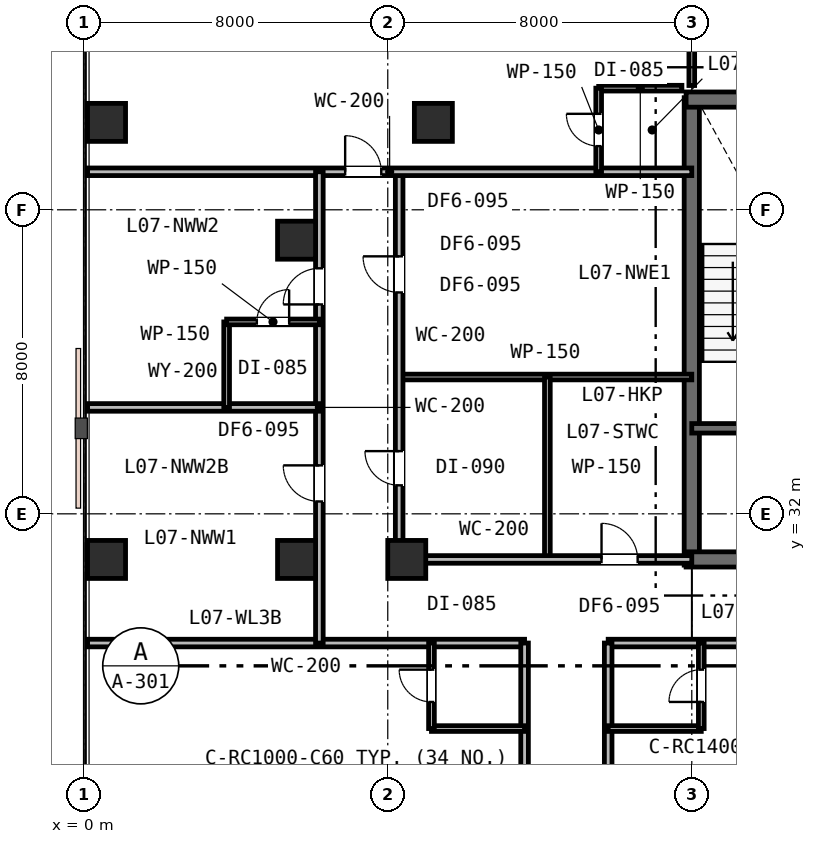
"""IFC4 building model, lengths in metres.
Left out: names, types, materials, properties, quantities, classifications, styles, units other than length and angle.
Written with IfcOpenShell. Run it as: python <this file> out.ifc"""

import sys

from ifc_helpers import new_model, si_unit, direction, frame, frame_2d, origin, origin_2d, place, context, subcontext, project, spatial, rectangle, extrude, element, fill, save


model = new_model("IFC4")
c1 = context("Model", 3, precision=1e-05, world=origin(), true_north=direction((0.0, 1.0)))
c2 = subcontext(c1, "Body", "Model", "MODEL_VIEW")
j1 = project(units=[si_unit("LENGTHUNIT", "METRE"), si_unit("PLANEANGLEUNIT", "RADIAN")], contexts=[c1])
p1 = place(None, origin())
s1 = spatial("IfcSite", under=j1, at=p1, CompositionType="ELEMENT")
p2 = place(p1, origin())
s2 = spatial("IfcBuilding", under=s1, at=p2, CompositionType="ELEMENT")
p3 = place(p2, frame((0.0, 0.0, 33.0)))
s3 = spatial("IfcBuildingStorey", under=s2, at=p3, CompositionType="ELEMENT", Elevation=33.0)
p4 = place(p3, frame((16.0, 30.65, 0.0), z_axis=(0.0, 0.0, 1.0), x_axis=(0.0, 1.0, 0.0)))
e1 = element("IfcWall", 1, at=p4, inside=s3, PredefinedType="SHEAR", context=c2, shape_type="SweptSolid", body=[
    extrude(rectangle(XDim=12.3, YDim=0.4, at=frame_2d((6.15, 0.0))), origin(), (0.0, 0.0, 1.0), 3.6),
])
p5 = place(p3, frame((15.85, 42.9, 0.0), z_axis=(0.0, 0.0, 1.0), x_axis=(1.0, 0.0, 0.0)))
e2 = element("IfcWall", 2, at=p5, inside=s3, PredefinedType="SHEAR", context=c2, shape_type="SweptSolid", body=[
    extrude(rectangle(XDim=24.3, YDim=0.4, at=frame_2d((12.15, 0.0))), origin(), (0.0, 0.0, 1.0), 3.6),
])
p6 = place(p3, frame((15.85, 30.8, 0.0), z_axis=(0.0, 0.0, 1.0), x_axis=(1.0, 0.0, 0.0)))
e3 = element("IfcWall", 3, at=p6, inside=s3, PredefinedType="SHEAR", context=c2, shape_type="SweptSolid", body=[
    extrude(rectangle(XDim=11.2, YDim=0.4, at=frame_2d((5.6, 0.0))), origin(), (0.0, 0.0, 1.0), 3.6),
])
p7 = place(p6, frame((2.45, 0.0, 0.0)))
e4 = element("IfcOpeningElement", 4, at=p7, cuts=e3, PredefinedType="OPENING", context=c2, shape_type="SweptSolid", body=[
    extrude(rectangle(XDim=1.1, YDim=2.15, at=frame_2d((0.55, 1.075))), frame((0.0, 0.21, 0.0), z_axis=(0.0, -1.0, 0.0), x_axis=(1.0, 0.0, 0.0)), (0.0, 0.0, 1.0), 0.42),
])
p8 = place(p3, frame((16.0, 34.25, 0.0), z_axis=(0.0, 0.0, 1.0), x_axis=(1.0, 0.0, 0.0)))
e5 = element("IfcWall", 5, at=p8, inside=s3, PredefinedType="SHEAR", context=c2, shape_type="SweptSolid", body=[
    extrude(rectangle(XDim=6.05, YDim=0.25, at=frame_2d((3.025, 0.0))), origin(), (0.0, 0.0, 1.0), 3.6),
])
p9 = place(p8, frame((1.25, 0.0, 0.0)))
e6 = element("IfcOpeningElement", 6, at=p9, cuts=e5, PredefinedType="OPENING", context=c2, shape_type="SweptSolid", body=[
    extrude(rectangle(XDim=1.0, YDim=2.15, at=frame_2d((0.5, 1.075))), frame((0.0, 0.135, 0.0), z_axis=(0.0, -1.0, 0.0), x_axis=(1.0, 0.0, 0.0)), (0.0, 0.0, 1.0), 0.27),
])
p10 = place(p8, frame((4.2, 0.0, 0.0)))
e7 = element("IfcOpeningElement", 7, at=p10, cuts=e5, PredefinedType="OPENING", context=c2, shape_type="SweptSolid", body=[
    extrude(rectangle(XDim=1.1, YDim=2.15, at=frame_2d((0.55, 1.075))), frame((0.0, 0.135, 0.0), z_axis=(0.0, -1.0, 0.0), x_axis=(1.0, 0.0, 0.0)), (0.0, 0.0, 1.0), 0.27),
])
for number, where, z_axis, x_axis in (
    (8, (5.6, 30.8, 0.0), (0.0, 0.0, 1.0), (1.0, 0.0, 0.0)),
    (9, (5.6, 39.2, 0.0), (0.0, 0.0, 1.0), (1.0, 0.0, 0.0)),
    (10, (8.5, 30.8, 0.0), (0.0, 0.0, 1.0), (1.0, 0.0, 0.0)),
    (11, (9.2, 42.3, 0.0), (0.0, 0.0, 1.0), (1.0, 0.0, 0.0)),
    (12, (0.6, 30.8, 0.0), (0.0, 0.0, 1.0), (1.0, 0.0, 0.0)),
    (13, (0.6, 42.3, 0.0), (0.0, 0.0, 1.0), (1.0, 0.0, 0.0)),
):
    element("IfcColumn", number, at=place(p3, frame(where, z_axis=z_axis, x_axis=x_axis)), inside=s3, PredefinedType="COLUMN", context=c2, shape_type="SweptSolid", body=[
        extrude(rectangle(XDim=1.0, YDim=1.0, at=origin_2d()), origin(), (0.0, 0.0, 1.0), 3.6),
    ])
p11 = place(p3, frame((0.1, 28.6, 0.0), z_axis=(0.0, 0.0, 1.0), x_axis=(1.0, 0.0, 0.0)))
e14 = element("IfcWall", 14, at=p11, inside=s3, PredefinedType="PARTITIONING", context=c2, shape_type="SweptSolid", body=[
    extrude(rectangle(XDim=11.5, YDim=0.2, at=frame_2d((5.75, 0.0))), origin(), (0.0, 0.0, 1.0), 2.68),
])
p12 = place(p3, frame((13.8, 28.6, 0.0), z_axis=(0.0, 0.0, 1.0), x_axis=(1.0, 0.0, 0.0)))
e15 = element("IfcWall", 15, at=p12, inside=s3, PredefinedType="PARTITIONING", context=c2, shape_type="SweptSolid", body=[
    extrude(rectangle(XDim=36.6, YDim=0.2, at=frame_2d((18.3, 0.0))), origin(), (0.0, 0.0, 1.0), 2.68),
])
p13 = place(p12, frame((12.3, 0.0, 0.0)))
e16 = element("IfcOpeningElement", 16, at=p13, cuts=e15, PredefinedType="OPENING", context=c2, shape_type="SweptSolid", body=[
    extrude(rectangle(XDim=0.95, YDim=2.15, at=frame_2d((0.475, 1.075))), frame((0.0, 0.11, 0.0), z_axis=(0.0, -1.0, 0.0), x_axis=(1.0, 0.0, 0.0)), (0.0, 0.0, 1.0), 0.22),
])
p14 = place(p12, frame((20.075, 0.0, 0.0)))
e17 = element("IfcOpeningElement", 17, at=p14, cuts=e15, PredefinedType="OPENING", context=c2, shape_type="SweptSolid", body=[
    extrude(rectangle(XDim=0.95, YDim=2.15, at=frame_2d((0.475, 1.075))), frame((0.0, 0.11, 0.0), z_axis=(0.0, -1.0, 0.0), x_axis=(1.0, 0.0, 0.0)), (0.0, 0.0, 1.0), 0.22),
])
p15 = place(p12, frame((26.829, 0.0, 0.0)))
e18 = element("IfcOpeningElement", 18, at=p15, cuts=e15, PredefinedType="OPENING", context=c2, shape_type="SweptSolid", body=[
    extrude(rectangle(XDim=0.95, YDim=2.15, at=frame_2d((0.475, 1.075))), frame((0.0, 0.11, 0.0), z_axis=(0.0, -1.0, 0.0), x_axis=(1.0, 0.0, 0.0)), (0.0, 0.0, 1.0), 0.22),
])
p16 = place(p12, frame((32.669, 0.0, 0.0)))
e19 = element("IfcOpeningElement", 19, at=p16, cuts=e15, PredefinedType="OPENING", context=c2, shape_type="SweptSolid", body=[
    extrude(rectangle(XDim=0.95, YDim=2.15, at=frame_2d((0.475, 1.075))), frame((0.0, 0.11, 0.0), z_axis=(0.0, -1.0, 0.0), x_axis=(1.0, 0.0, 0.0)), (0.0, 0.0, 1.0), 0.22),
])
p17 = place(p3, frame((8.3, 35.6, 0.0), z_axis=(0.0, 0.0, 1.0), x_axis=(1.0, 0.0, 0.0)))
e20 = element("IfcWall", 20, at=p17, inside=s3, PredefinedType="PARTITIONING", context=c2, shape_type="SweptSolid", body=[
    extrude(rectangle(XDim=7.7, YDim=0.15, at=frame_2d((3.85, 0.0))), origin(), (0.0, 0.0, 1.0), 2.68),
])
p18 = place(p3, frame((12.2, 30.8, 0.0), z_axis=(0.0, 0.0, 1.0), x_axis=(0.0, 1.0, 0.0)))
e21 = element("IfcWall", 21, at=p18, inside=s3, PredefinedType="PARTITIONING", context=c2, shape_type="SweptSolid", body=[
    extrude(rectangle(XDim=4.8, YDim=0.15, at=frame_2d((2.4, 0.0))), origin(), (0.0, 0.0, 1.0), 2.68),
])
p19 = place(p3, frame((8.3, 30.8, 0.0), z_axis=(0.0, 0.0, 1.0), x_axis=(1.0, 0.0, 0.0)))
e22 = element("IfcWall", 22, at=p19, inside=s3, PredefinedType="PARTITIONING", context=c2, shape_type="SweptSolid", body=[
    extrude(rectangle(XDim=7.7, YDim=0.2, at=frame_2d((3.85, 0.0))), origin(), (0.0, 0.0, 1.0), 2.68),
])
p20 = place(p19, frame((5.325, 0.0, 0.0)))
e23 = element("IfcOpeningElement", 23, at=p20, cuts=e22, PredefinedType="OPENING", context=c2, shape_type="SweptSolid", body=[
    extrude(rectangle(XDim=0.95, YDim=2.15, at=frame_2d((0.475, 1.075))), frame((0.0, 0.11, 0.0), z_axis=(0.0, -1.0, 0.0), x_axis=(1.0, 0.0, 0.0)), (0.0, 0.0, 1.0), 0.22),
])
p21 = place(p3, frame((8.3, 30.8, 0.0), z_axis=(0.0, 0.0, 1.0), x_axis=(0.0, 1.0, 0.0)))
e24 = element("IfcWall", 24, at=p21, inside=s3, PredefinedType="PARTITIONING", context=c2, shape_type="SweptSolid", body=[
    extrude(rectangle(XDim=10.2, YDim=0.2, at=frame_2d((5.1, 0.0))), origin(), (0.0, 0.0, 1.0), 2.68),
])
p22 = place(p21, frame((1.95, 0.0, 0.0)))
e25 = element("IfcOpeningElement", 25, at=p22, cuts=e24, PredefinedType="OPENING", context=c2, shape_type="SweptSolid", body=[
    extrude(rectangle(XDim=0.9, YDim=2.15, at=frame_2d((0.45, 1.075))), frame((0.0, 0.11, 0.0), z_axis=(0.0, -1.0, 0.0), x_axis=(1.0, 0.0, 0.0)), (0.0, 0.0, 1.0), 0.22),
])
p23 = place(p21, frame((7.025, 0.0, 0.0)))
e26 = element("IfcOpeningElement", 26, at=p23, cuts=e24, PredefinedType="OPENING", context=c2, shape_type="SweptSolid", body=[
    extrude(rectangle(XDim=0.95, YDim=2.15, at=frame_2d((0.475, 1.075))), frame((0.0, 0.11, 0.0), z_axis=(0.0, -1.0, 0.0), x_axis=(1.0, 0.0, 0.0)), (0.0, 0.0, 1.0), 0.22),
])
p24 = place(p3, frame((0.1, 41.0, 0.0), z_axis=(0.0, 0.0, 1.0), x_axis=(1.0, 0.0, 0.0)))
e27 = element("IfcWall", 27, at=p24, inside=s3, PredefinedType="PARTITIONING", context=c2, shape_type="SweptSolid", body=[
    extrude(rectangle(XDim=15.9, YDim=0.2, at=frame_2d((7.95, 0.0))), origin(), (0.0, 0.0, 1.0), 2.68),
])
p25 = place(p24, frame((6.779, 0.0, 0.0)))
e28 = element("IfcOpeningElement", 28, at=p25, cuts=e27, PredefinedType="OPENING", context=c2, shape_type="SweptSolid", body=[
    extrude(rectangle(XDim=0.95, YDim=2.15, at=frame_2d((0.475, 1.075))), frame((0.0, 0.11, 0.0), z_axis=(0.0, -1.0, 0.0), x_axis=(1.0, 0.0, 0.0)), (0.0, 0.0, 1.0), 0.22),
])
p26 = place(p3, frame((13.55, 43.2, 0.0), z_axis=(0.0, 0.0, 1.0), x_axis=(1.0, 0.0, 0.0)))
e29 = element("IfcWall", 29, at=p26, inside=s3, PredefinedType="PARTITIONING", context=c2, shape_type="SweptSolid", body=[
    extrude(rectangle(XDim=2.19, YDim=0.15, at=frame_2d((1.095, 0.0))), origin(), (0.0, 0.0, 1.0), 3.33),
])
p27 = place(p3, frame((13.55, 41.0, 0.0), z_axis=(0.0, 0.0, 1.0), x_axis=(0.0, 1.0, 0.0)))
e30 = element("IfcWall", 30, at=p27, inside=s3, PredefinedType="PARTITIONING", context=c2, shape_type="SweptSolid", body=[
    extrude(rectangle(XDim=2.2, YDim=0.15, at=frame_2d((1.1, 0.0))), origin(), (0.0, 0.0, 1.0), 3.33),
])
p28 = place(p27, frame((0.675, 0.0, 0.0)))
e31 = element("IfcOpeningElement", 31, at=p28, cuts=e30, PredefinedType="OPENING", context=c2, shape_type="SweptSolid", body=[
    extrude(rectangle(XDim=0.85, YDim=2.15, at=frame_2d((0.425, 1.075))), frame((0.0, 0.085, 0.0), z_axis=(0.0, -1.0, 0.0), x_axis=(1.0, 0.0, 0.0)), (0.0, 0.0, 1.0), 0.17),
])
p29 = place(p3, frame((6.2, 28.6, 0.0), z_axis=(0.0, 0.0, 1.0), x_axis=(0.0, 1.0, 0.0)))
e32 = element("IfcWall", 32, at=p29, inside=s3, PredefinedType="PARTITIONING", context=c2, shape_type="SweptSolid", body=[
    extrude(rectangle(XDim=12.4, YDim=0.2, at=frame_2d((6.2, 0.0))), origin(), (0.0, 0.0, 1.0), 2.68),
])
p30 = place(p29, frame((3.725, 0.0, 0.0)))
e33 = element("IfcOpeningElement", 33, at=p30, cuts=e32, PredefinedType="OPENING", context=c2, shape_type="SweptSolid", body=[
    extrude(rectangle(XDim=0.95, YDim=2.15, at=frame_2d((0.475, 1.075))), frame((0.0, 0.11, 0.0), z_axis=(0.0, -1.0, 0.0), x_axis=(1.0, 0.0, 0.0)), (0.0, 0.0, 1.0), 0.22),
])
p31 = place(p29, frame((8.91, 0.0, 0.0)))
e34 = element("IfcOpeningElement", 34, at=p31, cuts=e32, PredefinedType="OPENING", context=c2, shape_type="SweptSolid", body=[
    extrude(rectangle(XDim=0.95, YDim=2.15, at=frame_2d((0.475, 1.075))), frame((0.0, 0.11, 0.0), z_axis=(0.0, -1.0, 0.0), x_axis=(1.0, 0.0, 0.0)), (0.0, 0.0, 1.0), 0.22),
])
p32 = place(p3, frame((0.1, 34.8, 0.0), z_axis=(0.0, 0.0, 1.0), x_axis=(1.0, 0.0, 0.0)))
e35 = element("IfcWall", 35, at=p32, inside=s3, PredefinedType="PARTITIONING", context=c2, shape_type="SweptSolid", body=[
    extrude(rectangle(XDim=6.1, YDim=0.2, at=frame_2d((3.05, 0.0))), origin(), (0.0, 0.0, 1.0), 2.68),
])
p33 = place(p3, frame((3.76, 34.8, 0.0), z_axis=(0.0, 0.0, 1.0), x_axis=(0.0, 1.0, 0.0)))
e36 = element("IfcWall", 36, at=p33, inside=s3, PredefinedType="PARTITIONING", context=c2, shape_type="SweptSolid", body=[
    extrude(rectangle(XDim=2.25, YDim=0.15, at=frame_2d((1.125, 0.0))), origin(), (0.0, 0.0, 1.0), 3.33),
])
p34 = place(p3, frame((3.76, 37.05, 0.0), z_axis=(0.0, 0.0, 1.0), x_axis=(1.0, 0.0, 0.0)))
e37 = element("IfcWall", 37, at=p34, inside=s3, PredefinedType="PARTITIONING", context=c2, shape_type="SweptSolid", body=[
    extrude(rectangle(XDim=2.44, YDim=0.15, at=frame_2d((1.22, 0.0))), origin(), (0.0, 0.0, 1.0), 2.68),
])
p35 = place(p34, frame((0.795, 0.0, 0.0)))
e38 = element("IfcOpeningElement", 38, at=p35, cuts=e37, PredefinedType="OPENING", context=c2, shape_type="SweptSolid", body=[
    extrude(rectangle(XDim=0.85, YDim=2.15, at=frame_2d((0.425, 1.075))), frame((0.0, 0.085, 0.0), z_axis=(0.0, -1.0, 0.0), x_axis=(1.0, 0.0, 0.0)), (0.0, 0.0, 1.0), 0.17),
])
p36 = place(p3, frame((16.0, 43.27, 0.0), z_axis=(0.0, 0.0, 1.0), x_axis=(0.0, 1.0, 0.0)))
e39 = element("IfcWall", 39, at=p36, inside=s3, PredefinedType="PARTITIONING", context=c2, shape_type="SweptSolid", body=[
    extrude(rectangle(XDim=4.63, YDim=0.15, at=frame_2d((2.315, 0.0))), origin(), (0.0, 0.0, 1.0), 2.87),
])
p37 = place(p3, frame((11.6, 5.6, 0.0), z_axis=(0.0, 0.0, 1.0), x_axis=(0.0, 1.0, 0.0)))
e40 = element("IfcWall", 40, at=p37, inside=s3, PredefinedType="PARTITIONING", context=c2, shape_type="SweptSolid", body=[
    extrude(rectangle(XDim=23.0, YDim=0.2, at=frame_2d((11.5, 0.0))), origin(), (0.0, 0.0, 1.0), 2.68),
])
p38 = place(p37, frame((2.19, 0.0, 0.0)))
e41 = element("IfcOpeningElement", 41, at=p38, cuts=e40, PredefinedType="OPENING", context=c2, shape_type="SweptSolid", body=[
    extrude(rectangle(XDim=0.95, YDim=2.15, at=frame_2d((0.475, 1.075))), frame((0.0, 0.11, 0.0), z_axis=(0.0, -1.0, 0.0), x_axis=(1.0, 0.0, 0.0)), (0.0, 0.0, 1.0), 0.22),
])
p39 = place(p37, frame((9.29, 0.0, 0.0)))
e42 = element("IfcOpeningElement", 42, at=p39, cuts=e40, PredefinedType="OPENING", context=c2, shape_type="SweptSolid", body=[
    extrude(rectangle(XDim=0.95, YDim=2.15, at=frame_2d((0.475, 1.075))), frame((0.0, 0.11, 0.0), z_axis=(0.0, -1.0, 0.0), x_axis=(1.0, 0.0, 0.0)), (0.0, 0.0, 1.0), 0.22),
])
p40 = place(p37, frame((16.64, 0.0, 0.0)))
e43 = element("IfcOpeningElement", 43, at=p40, cuts=e40, PredefinedType="OPENING", context=c2, shape_type="SweptSolid", body=[
    extrude(rectangle(XDim=0.95, YDim=2.15, at=frame_2d((0.475, 1.075))), frame((0.0, 0.11, 0.0), z_axis=(0.0, -1.0, 0.0), x_axis=(1.0, 0.0, 0.0)), (0.0, 0.0, 1.0), 0.22),
])
p41 = place(p3, frame((13.8, 5.6, 0.0), z_axis=(0.0, 0.0, 1.0), x_axis=(0.0, 1.0, 0.0)))
e44 = element("IfcWall", 44, at=p41, inside=s3, PredefinedType="PARTITIONING", context=c2, shape_type="SweptSolid", body=[
    extrude(rectangle(XDim=23.0, YDim=0.2, at=frame_2d((11.5, 0.0))), origin(), (0.0, 0.0, 1.0), 2.68),
])
p42 = place(p41, frame((0.752, 0.0, 0.0)))
e45 = element("IfcOpeningElement", 45, at=p42, cuts=e44, PredefinedType="OPENING", context=c2, shape_type="SweptSolid", body=[
    extrude(rectangle(XDim=0.95, YDim=2.15, at=frame_2d((0.475, 1.075))), frame((0.0, 0.11, 0.0), z_axis=(0.0, -1.0, 0.0), x_axis=(1.0, 0.0, 0.0)), (0.0, 0.0, 1.0), 0.22),
])
p43 = place(p41, frame((9.29, 0.0, 0.0)))
e46 = element("IfcOpeningElement", 46, at=p43, cuts=e44, PredefinedType="OPENING", context=c2, shape_type="SweptSolid", body=[
    extrude(rectangle(XDim=0.95, YDim=2.15, at=frame_2d((0.475, 1.075))), frame((0.0, 0.11, 0.0), z_axis=(0.0, -1.0, 0.0), x_axis=(1.0, 0.0, 0.0)), (0.0, 0.0, 1.0), 0.22),
])
p44 = place(p41, frame((16.494, 0.0, 0.0)))
e47 = element("IfcOpeningElement", 47, at=p44, cuts=e44, PredefinedType="OPENING", context=c2, shape_type="SweptSolid", body=[
    extrude(rectangle(XDim=0.95, YDim=2.15, at=frame_2d((0.475, 1.075))), frame((0.0, 0.11, 0.0), z_axis=(0.0, -1.0, 0.0), x_axis=(1.0, 0.0, 0.0)), (0.0, 0.0, 1.0), 0.22),
])
p45 = place(p3, frame((9.15, 26.35, 0.0), z_axis=(0.0, 0.0, 1.0), x_axis=(1.0, 0.0, 0.0)))
e48 = element("IfcWall", 48, at=p45, inside=s3, PredefinedType="PARTITIONING", context=c2, shape_type="SweptSolid", body=[
    extrude(rectangle(XDim=2.45, YDim=0.15, at=frame_2d((1.225, 0.0))), origin(), (0.0, 0.0, 1.0), 3.33),
])
p46 = place(p3, frame((9.15, 26.35, 0.0), z_axis=(0.0, 0.0, 1.0), x_axis=(0.0, 1.0, 0.0)))
e49 = element("IfcWall", 49, at=p46, inside=s3, PredefinedType="PARTITIONING", context=c2, shape_type="SweptSolid", body=[
    extrude(rectangle(XDim=2.25, YDim=0.15, at=frame_2d((1.125, 0.0))), origin(), (0.0, 0.0, 1.0), 3.33),
])
p47 = place(p46, frame((0.7, 0.0, 0.0)))
e50 = element("IfcOpeningElement", 50, at=p47, cuts=e49, PredefinedType="OPENING", context=c2, shape_type="SweptSolid", body=[
    extrude(rectangle(XDim=0.85, YDim=2.15, at=frame_2d((0.425, 1.075))), frame((0.0, 0.085, 0.0), z_axis=(0.0, -1.0, 0.0), x_axis=(1.0, 0.0, 0.0)), (0.0, 0.0, 1.0), 0.17),
])
p48 = place(p3, frame((13.8, 26.35, 0.0), z_axis=(0.0, 0.0, 1.0), x_axis=(1.0, 0.0, 0.0)))
e51 = element("IfcWall", 51, at=p48, inside=s3, PredefinedType="PARTITIONING", context=c2, shape_type="SweptSolid", body=[
    extrude(rectangle(XDim=2.45, YDim=0.15, at=frame_2d((1.225, 0.0))), origin(), (0.0, 0.0, 1.0), 2.68),
])
p49 = place(p3, frame((16.25, 26.35, 0.0), z_axis=(0.0, 0.0, 1.0), x_axis=(0.0, 1.0, 0.0)))
e52 = element("IfcWall", 52, at=p49, inside=s3, PredefinedType="PARTITIONING", context=c2, shape_type="SweptSolid", body=[
    extrude(rectangle(XDim=2.25, YDim=0.15, at=frame_2d((1.125, 0.0))), origin(), (0.0, 0.0, 1.0), 2.68),
])
p50 = place(p49, frame((0.7, 0.0, 0.0)))
e53 = element("IfcOpeningElement", 53, at=p50, cuts=e52, PredefinedType="OPENING", context=c2, shape_type="SweptSolid", body=[
    extrude(rectangle(XDim=0.85, YDim=2.15, at=frame_2d((0.425, 1.075))), frame((0.0, 0.085, 0.0), z_axis=(0.0, -1.0, 0.0), x_axis=(1.0, 0.0, 0.0)), (0.0, 0.0, 1.0), 0.17),
])
p51 = place(p20, origin())
e54 = element("IfcDoor", 54, at=p51, inside=s3, OperationType="SINGLE_SWING_LEFT", PredefinedType="DOOR", context=c2, shape_type="SweptSolid", body=[
    extrude(rectangle(XDim=0.95, YDim=2.15, at=frame_2d((0.475, 1.075))), frame((0.0, 0.025, 0.0), z_axis=(0.0, -1.0, 0.0), x_axis=(1.0, 0.0, 0.0)), (0.0, 0.0, 1.0), 0.05),
])
fill(e23, e54)
p52 = place(p22, origin())
e55 = element("IfcDoor", 55, at=p52, inside=s3, OperationType="SINGLE_SWING_RIGHT", PredefinedType="DOOR", context=c2, shape_type="SweptSolid", body=[
    extrude(rectangle(XDim=0.9, YDim=2.15, at=frame_2d((0.45, 1.075))), frame((0.0, 0.025, 0.0), z_axis=(0.0, -1.0, 0.0), x_axis=(1.0, 0.0, 0.0)), (0.0, 0.0, 1.0), 0.05),
])
fill(e25, e55)
p53 = place(p25, origin())
e56 = element("IfcDoor", 56, at=p53, inside=s3, OperationType="SINGLE_SWING_LEFT", PredefinedType="DOOR", context=c2, shape_type="SweptSolid", body=[
    extrude(rectangle(XDim=0.95, YDim=2.15, at=frame_2d((0.475, 1.075))), frame((0.0, 0.025, 0.0), z_axis=(0.0, -1.0, 0.0), x_axis=(1.0, 0.0, 0.0)), (0.0, 0.0, 1.0), 0.05),
])
fill(e28, e56)
p54 = place(p28, origin())
e57 = element("IfcDoor", 57, at=p54, inside=s3, OperationType="SINGLE_SWING_RIGHT", PredefinedType="DOOR", context=c2, shape_type="SweptSolid", body=[
    extrude(rectangle(XDim=0.85, YDim=2.15, at=frame_2d((0.425, 1.075))), frame((0.0, 0.025, 0.0), z_axis=(0.0, -1.0, 0.0), x_axis=(1.0, 0.0, 0.0)), (0.0, 0.0, 1.0), 0.05),
])
fill(e31, e57)
p55 = place(p30, origin())
e58 = element("IfcDoor", 58, at=p55, inside=s3, OperationType="SINGLE_SWING_RIGHT", PredefinedType="DOOR", context=c2, shape_type="SweptSolid", body=[
    extrude(rectangle(XDim=0.95, YDim=2.15, at=frame_2d((0.475, 1.075))), frame((0.0, 0.025, 0.0), z_axis=(0.0, -1.0, 0.0), x_axis=(1.0, 0.0, 0.0)), (0.0, 0.0, 1.0), 0.05),
])
fill(e33, e58)
p56 = place(p31, origin())
e59 = element("IfcDoor", 59, at=p56, inside=s3, OperationType="SINGLE_SWING_LEFT", PredefinedType="DOOR", context=c2, shape_type="SweptSolid", body=[
    extrude(rectangle(XDim=0.95, YDim=2.15, at=frame_2d((0.475, 1.075))), frame((0.0, 0.025, 0.0), z_axis=(0.0, -1.0, 0.0), x_axis=(1.0, 0.0, 0.0)), (0.0, 0.0, 1.0), 0.05),
])
fill(e34, e59)
p57 = place(p35, origin())
e60 = element("IfcDoor", 60, at=p57, inside=s3, OperationType="SINGLE_SWING_RIGHT", PredefinedType="DOOR", context=c2, shape_type="SweptSolid", body=[
    extrude(rectangle(XDim=0.85, YDim=2.15, at=frame_2d((0.425, 1.075))), frame((0.0, 0.025, 0.0), z_axis=(0.0, -1.0, 0.0), x_axis=(1.0, 0.0, 0.0)), (0.0, 0.0, 1.0), 0.05),
])
fill(e38, e60)
p58 = place(p23, origin())
e61 = element("IfcDoor", 61, at=p58, inside=s3, OperationType="SINGLE_SWING_RIGHT", PredefinedType="DOOR", context=c2, shape_type="SweptSolid", body=[
    extrude(rectangle(XDim=0.95, YDim=2.15, at=frame_2d((0.475, 1.075))), frame((0.0, 0.025, 0.0), z_axis=(0.0, -1.0, 0.0), x_axis=(1.0, 0.0, 0.0)), (0.0, 0.0, 1.0), 0.05),
])
fill(e26, e61)
p59 = place(p47, origin())
e62 = element("IfcDoor", 62, at=p59, inside=s3, OperationType="SINGLE_SWING_RIGHT", PredefinedType="DOOR", context=c2, shape_type="SweptSolid", body=[
    extrude(rectangle(XDim=0.85, YDim=2.15, at=frame_2d((0.425, 1.075))), frame((0.0, 0.025, 0.0), z_axis=(0.0, -1.0, 0.0), x_axis=(1.0, 0.0, 0.0)), (0.0, 0.0, 1.0), 0.05),
])
fill(e50, e62)
p60 = place(p50, origin())
e63 = element("IfcDoor", 63, at=p60, inside=s3, OperationType="SINGLE_SWING_LEFT", PredefinedType="DOOR", context=c2, shape_type="SweptSolid", body=[
    extrude(rectangle(XDim=0.85, YDim=2.15, at=frame_2d((0.425, 1.075))), frame((0.0, 0.025, 0.0), z_axis=(0.0, -1.0, 0.0), x_axis=(1.0, 0.0, 0.0)), (0.0, 0.0, 1.0), 0.05),
])
fill(e53, e63)
save(model, sys.argv[1])
